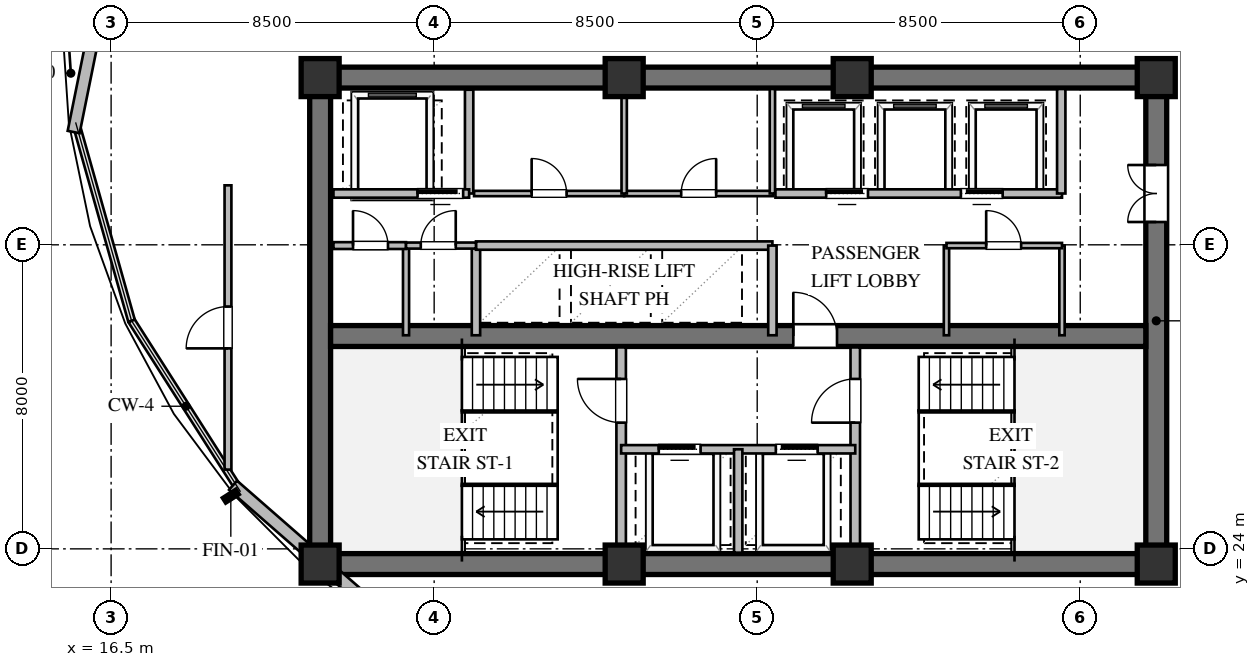
"""IFC4 building model, lengths in metres.
Left out: names, types, materials, properties, quantities, classifications, styles, units other than length and angle.
Written with IfcOpenShell. Run it as: python <this file> out.ifc"""

import sys

from ifc_helpers import new_model, si_unit, direction, frame, frame_2d, origin, origin_2d, place, context, subcontext, project, spatial, rectangle, extrude, element, fill, save


model = new_model("IFC4")
c1 = context("Model", 3, precision=1e-05, world=origin(), true_north=direction((0.0, 1.0)))
c2 = subcontext(c1, "Body", "Model", "MODEL_VIEW")
j1 = project(units=[si_unit("LENGTHUNIT", "METRE"), si_unit("PLANEANGLEUNIT", "RADIAN")], contexts=[c1])
p1 = place(None, origin())
s1 = spatial("IfcSite", under=j1, at=p1, CompositionType="ELEMENT")
p2 = place(p1, origin())
s2 = spatial("IfcBuilding", under=s1, at=p2, CompositionType="ELEMENT")
p3 = place(p2, frame((0.0, 0.0, 106.2)))
s3 = spatial("IfcBuildingStorey", under=s2, at=p3, CompositionType="ELEMENT", Elevation=106.2)
for number, where, z_axis, x_axis in (
    (1, (21.725, 23.6, 0.0), (0.0, 0.0, 1.0), (1.0, 0.0, 0.0)),
    (2, (21.725, 36.4, 0.0), (0.0, 0.0, 1.0), (1.0, 0.0, 0.0)),
):
    element("IfcWall", number, at=place(p3, frame(where, z_axis=z_axis, x_axis=x_axis)), inside=s3, PredefinedType="SHEAR", context=c2, shape_type="SweptSolid", body=[
        extrude(rectangle(XDim=22.55, YDim=0.55, at=frame_2d((11.275, 0.0))), origin(), (0.0, 0.0, 1.0), 3.36),
    ])
p4 = place(p3, frame((22.0, 23.875, 0.0), z_axis=(0.0, 0.0, 1.0), x_axis=(0.0, 1.0, 0.0)))
e3 = element("IfcWall", 3, at=p4, inside=s3, PredefinedType="SHEAR", context=c2, shape_type="SweptSolid", body=[
    extrude(rectangle(XDim=12.25, YDim=0.55, at=frame_2d((6.125, 0.0))), origin(), (0.0, 0.0, 1.0), 3.36),
])
p5 = place(p3, frame((44.0, 23.875, 0.0), z_axis=(0.0, 0.0, 1.0), x_axis=(0.0, 1.0, 0.0)))
e4 = element("IfcWall", 4, at=p5, inside=s3, PredefinedType="SHEAR", context=c2, shape_type="SweptSolid", body=[
    extrude(rectangle(XDim=12.25, YDim=0.55, at=frame_2d((6.125, 0.0))), origin(), (0.0, 0.0, 1.0), 3.36),
])
p6 = place(p5, frame((8.725, 0.0, 0.0)))
e5 = element("IfcOpeningElement", 5, at=p6, cuts=e4, PredefinedType="OPENING", context=c2, shape_type="SweptSolid", body=[
    extrude(rectangle(XDim=1.5, YDim=2.15, at=frame_2d((0.75, 1.075))), frame((0.0, 0.285, 0.0), z_axis=(0.0, -1.0, 0.0), x_axis=(1.0, 0.0, 0.0)), (0.0, 0.0, 1.0), 0.57),
])
p7 = place(p3, frame((22.275, 29.6, 0.0), z_axis=(0.0, 0.0, 1.0), x_axis=(1.0, 0.0, 0.0)))
e6 = element("IfcWall", 6, at=p7, inside=s3, PredefinedType="SHEAR", context=c2, shape_type="SweptSolid", body=[
    extrude(rectangle(XDim=21.45, YDim=0.55, at=frame_2d((10.725, 0.0))), origin(), (0.0, 0.0, 1.0), 3.36),
])
p8 = place(p7, frame((12.175, 0.0, 0.0)))
e7 = element("IfcOpeningElement", 7, at=p8, cuts=e6, PredefinedType="OPENING", context=c2, shape_type="SweptSolid", body=[
    extrude(rectangle(XDim=1.15, YDim=2.1, at=frame_2d((0.575, 1.05))), frame((0.0, 0.285, 0.0), z_axis=(0.0, -1.0, 0.0), x_axis=(1.0, 0.0, 0.0)), (0.0, 0.0, 1.0), 0.57),
])
for number, where, z_axis, x_axis in (
    (8, (22.0, 23.6, 0.0), (0.0, 0.0, 1.0), (1.0, 0.0, 0.0)),
    (9, (30.0, 23.6, 0.0), (0.0, 0.0, 1.0), (1.0, 0.0, 0.0)),
    (10, (36.0, 23.6, 0.0), (0.0, 0.0, 1.0), (1.0, 0.0, 0.0)),
    (11, (44.0, 23.6, 0.0), (0.0, 0.0, 1.0), (1.0, 0.0, 0.0)),
    (12, (44.0, 36.4, 0.0), (0.0, 0.0, 1.0), (1.0, 0.0, 0.0)),
    (13, (36.0, 36.4, 0.0), (0.0, 0.0, 1.0), (1.0, 0.0, 0.0)),
    (14, (30.0, 36.4, 0.0), (0.0, 0.0, 1.0), (1.0, 0.0, 0.0)),
    (15, (22.0, 36.4, 0.0), (0.0, 0.0, 1.0), (1.0, 0.0, 0.0)),
):
    element("IfcColumn", number, at=place(p3, frame(where, z_axis=z_axis, x_axis=x_axis)), inside=s3, PredefinedType="COLUMN", context=c2, shape_type="SweptSolid", body=[
        extrude(rectangle(XDim=1.0, YDim=1.0, at=origin_2d()), origin(), (0.0, 0.0, 1.0), 3.6),
    ])
p9 = place(p3, frame((24.225, 21.727, 0.0), z_axis=(0.0, 0.0, 1.0), x_axis=(-0.753105964003, 0.657899237713, 0.0)))
e16 = element("IfcWall", 16, at=p9, inside=s3, PredefinedType="STANDARD", context=c2, shape_type="SweptSolid", body=[
    extrude(rectangle(XDim=5.998, YDim=0.32, at=frame_2d((2.999, 0.0))), origin(), (0.0, 0.0, 1.0), 2.35),
])
p10 = place(p3, frame((15.514, 34.967, 0.0), z_axis=(0.0, 0.0, 1.0), x_axis=(0.198370893133, 0.980127026848, 0.0)))
e17 = element("IfcWall", 17, at=p10, inside=s3, PredefinedType="STANDARD", context=c2, shape_type="SweptSolid", body=[
    extrude(rectangle(XDim=14.469, YDim=0.32, at=frame_2d((7.234, 0.0))), origin(), (0.0, 0.0, 1.0), 3.36),
])
p11 = place(p3, frame((29.92, 23.9, 0.0), z_axis=(0.0, 0.0, 1.0), x_axis=(0.0, 1.0, 0.0)))
e18 = element("IfcWall", 18, at=p11, inside=s3, PredefinedType="SOLIDWALL", context=c2, shape_type="SweptSolid", body=[
    extrude(rectangle(XDim=5.4, YDim=0.25, at=frame_2d((2.7, 0.0))), origin(), (0.0, 0.0, 1.0), 2.89),
])
p12 = place(p11, frame((3.421, 0.0, 0.0)))
e19 = element("IfcOpeningElement", 19, at=p12, cuts=e18, PredefinedType="OPENING", context=c2, shape_type="SweptSolid", body=[
    extrude(rectangle(XDim=1.15, YDim=2.1, at=frame_2d((0.575, 1.05))), frame((0.0, 0.135, 0.0), z_axis=(0.0, -1.0, 0.0), x_axis=(1.0, 0.0, 0.0)), (0.0, 0.0, 1.0), 0.27),
])
p13 = place(p3, frame((36.08, 23.9, 0.0), z_axis=(0.0, 0.0, 1.0), x_axis=(0.0, 1.0, 0.0)))
e20 = element("IfcWall", 20, at=p13, inside=s3, PredefinedType="SOLIDWALL", context=c2, shape_type="SweptSolid", body=[
    extrude(rectangle(XDim=5.4, YDim=0.25, at=frame_2d((2.7, 0.0))), origin(), (0.0, 0.0, 1.0), 3.36),
])
p14 = place(p13, frame((3.421, 0.0, 0.0)))
e21 = element("IfcOpeningElement", 21, at=p14, cuts=e20, PredefinedType="OPENING", context=c2, shape_type="SweptSolid", body=[
    extrude(rectangle(XDim=1.15, YDim=2.1, at=frame_2d((0.575, 1.05))), frame((0.0, 0.135, 0.0), z_axis=(0.0, -1.0, 0.0), x_axis=(1.0, 0.0, 0.0)), (0.0, 0.0, 1.0), 0.27),
])
p15 = place(p3, frame((29.92, 26.62, 0.0), z_axis=(0.0, 0.0, 1.0), x_axis=(1.0, 0.0, 0.0)))
e22 = element("IfcWall", 22, at=p15, inside=s3, PredefinedType="SOLIDWALL", context=c2, shape_type="SweptSolid", body=[
    extrude(rectangle(XDim=6.16, YDim=0.22, at=frame_2d((3.08, 0.0))), origin(), (0.0, 0.0, 1.0), 3.36),
])
p16 = place(p15, frame((0.99, 0.0, 0.0)))
e23 = element("IfcOpeningElement", 23, at=p16, cuts=e22, PredefinedType="OPENING", context=c2, shape_type="SweptSolid", body=[
    extrude(rectangle(XDim=1.1, YDim=2.1, at=frame_2d((0.55, 1.05))), frame((0.0, 0.12, 0.0), z_axis=(0.0, -1.0, 0.0), x_axis=(1.0, 0.0, 0.0)), (0.0, 0.0, 1.0), 0.24),
])
p17 = place(p15, frame((4.07, 0.0, 0.0)))
e24 = element("IfcOpeningElement", 24, at=p17, cuts=e22, PredefinedType="OPENING", context=c2, shape_type="SweptSolid", body=[
    extrude(rectangle(XDim=1.1, YDim=2.1, at=frame_2d((0.55, 1.05))), frame((0.0, 0.12, 0.0), z_axis=(0.0, -1.0, 0.0), x_axis=(1.0, 0.0, 0.0)), (0.0, 0.0, 1.0), 0.24),
])
p18 = place(p3, frame((33.0, 23.9, 0.0), z_axis=(0.0, 0.0, 1.0), x_axis=(0.0, 1.0, 0.0)))
e25 = element("IfcWall", 25, at=p18, inside=s3, PredefinedType="SOLIDWALL", context=c2, shape_type="SweptSolid", body=[
    extrude(rectangle(XDim=2.72, YDim=0.22, at=frame_2d((1.36, 0.0))), origin(), (0.0, 0.0, 1.0), 3.36),
])
p19 = place(p3, frame((25.92, 33.35, 0.0), z_axis=(0.0, 0.0, 1.0), x_axis=(0.0, 1.0, 0.0)))
e26 = element("IfcWall", 26, at=p19, inside=s3, PredefinedType="SOLIDWALL", context=c2, shape_type="SweptSolid", body=[
    extrude(rectangle(XDim=2.73, YDim=0.22, at=frame_2d((1.365, 0.0))), origin(), (0.0, 0.0, 1.0), 3.36),
])
p20 = place(p3, frame((22.35, 33.35, 0.0), z_axis=(0.0, 0.0, 1.0), x_axis=(1.0, 0.0, 0.0)))
e27 = element("IfcWall", 27, at=p20, inside=s3, PredefinedType="SOLIDWALL", context=c2, shape_type="SweptSolid", body=[
    extrude(rectangle(XDim=3.57, YDim=0.22, at=frame_2d((1.785, 0.0))), origin(), (0.0, 0.0, 1.0), 3.36),
])
p21 = place(p20, frame((2.213, 0.0, 0.0)))
e28 = element("IfcOpeningElement", 28, at=p21, cuts=e27, PredefinedType="OPENING", context=c2, shape_type="SweptSolid", body=[
    extrude(rectangle(XDim=1.2, YDim=2.1, at=frame_2d((0.6, 1.05))), frame((0.0, 0.12, 0.0), z_axis=(0.0, -1.0, 0.0), x_axis=(1.0, 0.0, 0.0)), (0.0, 0.0, 1.0), 0.24),
])
p22 = place(p3, frame((26.1, 29.62, 0.0), z_axis=(0.0, 0.0, 1.0), x_axis=(0.0, 1.0, 0.0)))
e29 = element("IfcWall", 29, at=p22, inside=s3, PredefinedType="SOLIDWALL", context=c2, shape_type="SweptSolid", body=[
    extrude(rectangle(XDim=2.36, YDim=0.22, at=frame_2d((1.18, 0.0))), origin(), (0.0, 0.0, 1.0), 3.36),
])
p23 = place(p3, frame((26.1, 31.98, 0.0), z_axis=(0.0, 0.0, 1.0), x_axis=(1.0, 0.0, 0.0)))
e30 = element("IfcWall", 30, at=p23, inside=s3, PredefinedType="SOLIDWALL", context=c2, shape_type="SweptSolid", body=[
    extrude(rectangle(XDim=7.8, YDim=0.22, at=frame_2d((3.9, 0.0))), origin(), (0.0, 0.0, 1.0), 3.36),
])
p24 = place(p3, frame((33.9, 29.62, 0.0), z_axis=(0.0, 0.0, 1.0), x_axis=(0.0, 1.0, 0.0)))
e31 = element("IfcWall", 31, at=p24, inside=s3, PredefinedType="SOLIDWALL", context=c2, shape_type="SweptSolid", body=[
    extrude(rectangle(XDim=2.36, YDim=0.22, at=frame_2d((1.18, 0.0))), origin(), (0.0, 0.0, 1.0), 3.36),
])
p25 = place(p3, frame((26.05, 33.35, 0.0), z_axis=(0.0, 0.0, 1.0), x_axis=(1.0, 0.0, 0.0)))
e32 = element("IfcWall", 32, at=p25, inside=s3, PredefinedType="PARTITIONING", context=c2, shape_type="SweptSolid", body=[
    extrude(rectangle(XDim=3.95, YDim=0.14, at=frame_2d((1.975, 0.0))), origin(), (0.0, 0.0, 1.0), 3.36),
])
p26 = place(p25, frame((1.515, 0.0, 0.0)))
e33 = element("IfcOpeningElement", 33, at=p26, cuts=e32, PredefinedType="OPENING", context=c2, shape_type="SweptSolid", body=[
    extrude(rectangle(XDim=0.92, YDim=2.1, at=frame_2d((0.46, 1.05))), frame((0.0, 0.08, 0.0), z_axis=(0.0, -1.0, 0.0), x_axis=(1.0, 0.0, 0.0)), (0.0, 0.0, 1.0), 0.16),
])
p27 = place(p3, frame((30.0, 33.35, 0.0), z_axis=(0.0, 0.0, 1.0), x_axis=(1.0, 0.0, 0.0)))
e34 = element("IfcWall", 34, at=p27, inside=s3, PredefinedType="PARTITIONING", context=c2, shape_type="SweptSolid", body=[
    extrude(rectangle(XDim=3.92, YDim=0.14, at=frame_2d((1.96, 0.0))), origin(), (0.0, 0.0, 1.0), 3.36),
])
p28 = place(p27, frame((1.5, 0.0, 0.0)))
e35 = element("IfcOpeningElement", 35, at=p28, cuts=e34, PredefinedType="OPENING", context=c2, shape_type="SweptSolid", body=[
    extrude(rectangle(XDim=0.92, YDim=2.1, at=frame_2d((0.46, 1.05))), frame((0.0, 0.08, 0.0), z_axis=(0.0, -1.0, 0.0), x_axis=(1.0, 0.0, 0.0)), (0.0, 0.0, 1.0), 0.16),
])
for number, where, z_axis, x_axis in (
    (36, (30.0, 33.35, 0.0), (0.0, 0.0, 1.0), (0.0, 1.0, 0.0)),
    (37, (33.9, 33.35, 0.0), (0.0, 0.0, 1.0), (0.0, 1.0, 0.0)),
):
    element("IfcWall", number, at=place(p3, frame(where, z_axis=z_axis, x_axis=x_axis)), inside=s3, PredefinedType="PARTITIONING", context=c2, shape_type="SweptSolid", body=[
        extrude(rectangle(XDim=2.75, YDim=0.14, at=frame_2d((1.375, 0.0))), origin(), (0.0, 0.0, 1.0), 3.36),
    ])
p29 = place(p3, frame((33.98, 33.35, 0.0), z_axis=(0.0, 0.0, 1.0), x_axis=(1.0, 0.0, 0.0)))
e38 = element("IfcWall", 38, at=p29, inside=s3, PredefinedType="SOLIDWALL", context=c2, shape_type="SweptSolid", body=[
    extrude(rectangle(XDim=7.54, YDim=0.22, at=frame_2d((3.77, 0.0))), origin(), (0.0, 0.0, 1.0), 3.36),
])
p30 = place(p29, frame((1.335, 0.0, 0.0)))
e39 = element("IfcOpeningElement", 39, at=p30, cuts=e38, PredefinedType="OPENING", context=c2, shape_type="SweptSolid", body=[
    extrude(rectangle(XDim=1.1, YDim=2.1, at=frame_2d((0.55, 1.05))), frame((0.0, 0.12, 0.0), z_axis=(0.0, -1.0, 0.0), x_axis=(1.0, 0.0, 0.0)), (0.0, 0.0, 1.0), 0.24),
])
p31 = place(p29, frame((4.879, 0.0, 0.0)))
e40 = element("IfcOpeningElement", 40, at=p31, cuts=e38, PredefinedType="OPENING", context=c2, shape_type="SweptSolid", body=[
    extrude(rectangle(XDim=1.1, YDim=2.1, at=frame_2d((0.55, 1.05))), frame((0.0, 0.12, 0.0), z_axis=(0.0, -1.0, 0.0), x_axis=(1.0, 0.0, 0.0)), (0.0, 0.0, 1.0), 0.24),
])
p32 = place(p3, frame((41.5, 33.35, 0.0), z_axis=(0.0, 0.0, 1.0), x_axis=(0.0, 1.0, 0.0)))
e41 = element("IfcWall", 41, at=p32, inside=s3, PredefinedType="SOLIDWALL", context=c2, shape_type="SweptSolid", body=[
    extrude(rectangle(XDim=2.75, YDim=0.22, at=frame_2d((1.375, 0.0))), origin(), (0.0, 0.0, 1.0), 3.36),
])
p33 = place(p3, frame((24.26, 29.62, 0.0), z_axis=(0.0, 0.0, 1.0), x_axis=(0.0, 1.0, 0.0)))
e42 = element("IfcWall", 42, at=p33, inside=s3, PredefinedType="PLUMBINGWALL", context=c2, shape_type="SweptSolid", body=[
    extrude(rectangle(XDim=2.36, YDim=0.16, at=frame_2d((1.18, 0.0))), origin(), (0.0, 0.0, 1.0), 3.36),
])
p34 = place(p3, frame((22.35, 31.98, 0.0), z_axis=(0.0, 0.0, 1.0), x_axis=(1.0, 0.0, 0.0)))
e43 = element("IfcWall", 43, at=p34, inside=s3, PredefinedType="PARTITIONING", context=c2, shape_type="SweptSolid", body=[
    extrude(rectangle(XDim=1.91, YDim=0.18, at=frame_2d((0.955, 0.0))), origin(), (0.0, 0.0, 1.0), 3.36),
])
p35 = place(p34, frame((0.515, 0.0, 0.0)))
e44 = element("IfcOpeningElement", 44, at=p35, cuts=e43, PredefinedType="OPENING", context=c2, shape_type="SweptSolid", body=[
    extrude(rectangle(XDim=0.92, YDim=2.1, at=frame_2d((0.46, 1.05))), frame((0.0, 0.1, 0.0), z_axis=(0.0, -1.0, 0.0), x_axis=(1.0, 0.0, 0.0)), (0.0, 0.0, 1.0), 0.2),
])
p36 = place(p3, frame((24.26, 31.98, 0.0), z_axis=(0.0, 0.0, 1.0), x_axis=(1.0, 0.0, 0.0)))
e45 = element("IfcWall", 45, at=p36, inside=s3, PredefinedType="PLUMBINGWALL", context=c2, shape_type="SweptSolid", body=[
    extrude(rectangle(XDim=1.84, YDim=0.16, at=frame_2d((0.92, 0.0))), origin(), (0.0, 0.0, 1.0), 3.36),
])
p37 = place(p36, frame((0.388, 0.0, 0.0)))
e46 = element("IfcOpeningElement", 46, at=p37, cuts=e45, PredefinedType="OPENING", context=c2, shape_type="SweptSolid", body=[
    extrude(rectangle(XDim=0.92, YDim=2.1, at=frame_2d((0.46, 1.05))), frame((0.0, 0.09, 0.0), z_axis=(0.0, -1.0, 0.0), x_axis=(1.0, 0.0, 0.0)), (0.0, 0.0, 1.0), 0.18),
])
for number, where, z_axis, x_axis in (
    (47, (38.48, 29.62, 0.0), (0.0, 0.0, 1.0), (0.0, 1.0, 0.0)),
    (48, (41.52, 29.62, 0.0), (0.0, 0.0, 1.0), (0.0, 1.0, 0.0)),
):
    element("IfcWall", number, at=place(p3, frame(where, z_axis=z_axis, x_axis=x_axis)), inside=s3, PredefinedType="PARTITIONING", context=c2, shape_type="SweptSolid", body=[
        extrude(rectangle(XDim=2.36, YDim=0.14, at=frame_2d((1.18, 0.0))), origin(), (0.0, 0.0, 1.0), 3.36),
    ])
p38 = place(p3, frame((38.48, 31.98, 0.0), z_axis=(0.0, 0.0, 1.0), x_axis=(1.0, 0.0, 0.0)))
e49 = element("IfcWall", 49, at=p38, inside=s3, PredefinedType="PARTITIONING", context=c2, shape_type="SweptSolid", body=[
    extrude(rectangle(XDim=3.04, YDim=0.14, at=frame_2d((1.52, 0.0))), origin(), (0.0, 0.0, 1.0), 3.36),
])
p39 = place(p38, frame((1.045, 0.0, 0.0)))
e50 = element("IfcOpeningElement", 50, at=p39, cuts=e49, PredefinedType="OPENING", context=c2, shape_type="SweptSolid", body=[
    extrude(rectangle(XDim=0.92, YDim=2.1, at=frame_2d((0.46, 1.05))), frame((0.0, 0.08, 0.0), z_axis=(0.0, -1.0, 0.0), x_axis=(1.0, 0.0, 0.0)), (0.0, 0.0, 1.0), 0.16),
])
p40 = place(p3, frame((19.575, 26.085, 0.0), z_axis=(0.0, 0.0, 1.0), x_axis=(0.0, 1.0, 0.0)))
e51 = element("IfcWall", 51, at=p40, inside=s3, PredefinedType="PARTITIONING", context=c2, shape_type="SweptSolid", body=[
    extrude(rectangle(XDim=7.48, YDim=0.18, at=frame_2d((3.74, 0.0))), origin(), (0.0, 0.0, 1.0), 2.657),
])
p41 = place(p40, frame((3.19, 0.0, 0.0)))
e52 = element("IfcOpeningElement", 52, at=p41, cuts=e51, PredefinedType="OPENING", context=c2, shape_type="SweptSolid", body=[
    extrude(rectangle(XDim=1.1, YDim=2.1, at=frame_2d((0.55, 1.05))), frame((0.0, 0.1, 0.0), z_axis=(0.0, -1.0, 0.0), x_axis=(1.0, 0.0, 0.0)), (0.0, 0.0, 1.0), 0.2),
])
p42 = place(p12, origin())
e53 = element("IfcDoor", 53, at=p42, inside=s3, OperationType="SINGLE_SWING_RIGHT", PredefinedType="DOOR", context=c2, shape_type="SweptSolid", body=[
    extrude(rectangle(XDim=1.15, YDim=2.1, at=frame_2d((0.575, 1.05))), frame((0.0, 0.025, 0.0), z_axis=(0.0, -1.0, 0.0), x_axis=(1.0, 0.0, 0.0)), (0.0, 0.0, 1.0), 0.05),
])
fill(e19, e53)
p43 = place(p14, origin())
e54 = element("IfcDoor", 54, at=p43, inside=s3, OperationType="SINGLE_SWING_LEFT", PredefinedType="DOOR", context=c2, shape_type="SweptSolid", body=[
    extrude(rectangle(XDim=1.15, YDim=2.1, at=frame_2d((0.575, 1.05))), frame((0.0, 0.025, 0.0), z_axis=(0.0, -1.0, 0.0), x_axis=(1.0, 0.0, 0.0)), (0.0, 0.0, 1.0), 0.05),
])
fill(e21, e54)
p44 = place(p16, origin())
e55 = element("IfcDoor", 55, at=p44, inside=s3, OperationType="SLIDING_TO_LEFT", PredefinedType="DOOR", context=c2, shape_type="SweptSolid", body=[
    extrude(rectangle(XDim=1.1, YDim=2.1, at=frame_2d((0.55, 1.05))), frame((0.0, 0.025, 0.0), z_axis=(0.0, -1.0, 0.0), x_axis=(1.0, 0.0, 0.0)), (0.0, 0.0, 1.0), 0.05),
])
fill(e23, e55)
p45 = place(p17, origin())
e56 = element("IfcDoor", 56, at=p45, inside=s3, OperationType="SLIDING_TO_RIGHT", PredefinedType="DOOR", context=c2, shape_type="SweptSolid", body=[
    extrude(rectangle(XDim=1.1, YDim=2.1, at=frame_2d((0.55, 1.05))), frame((0.0, 0.025, 0.0), z_axis=(0.0, -1.0, 0.0), x_axis=(1.0, 0.0, 0.0)), (0.0, 0.0, 1.0), 0.05),
])
fill(e24, e56)
p46 = place(p8, origin())
e57 = element("IfcDoor", 57, at=p46, inside=s3, OperationType="SINGLE_SWING_LEFT", PredefinedType="DOOR", context=c2, shape_type="SweptSolid", body=[
    extrude(rectangle(XDim=1.15, YDim=2.1, at=frame_2d((0.575, 1.05))), frame((0.0, 0.025, 0.0), z_axis=(0.0, -1.0, 0.0), x_axis=(1.0, 0.0, 0.0)), (0.0, 0.0, 1.0), 0.05),
])
fill(e7, e57)
p47 = place(p6, origin())
e58 = element("IfcDoor", 58, at=p47, inside=s3, OperationType="DOUBLE_DOOR_SINGLE_SWING", PredefinedType="DOOR", context=c2, shape_type="SweptSolid", body=[
    extrude(rectangle(XDim=1.5, YDim=2.15, at=frame_2d((0.75, 1.075))), frame((0.0, 0.025, 0.0), z_axis=(0.0, -1.0, 0.0), x_axis=(1.0, 0.0, 0.0)), (0.0, 0.0, 1.0), 0.05),
])
fill(e5, e58)
p48 = place(p21, origin())
e59 = element("IfcDoor", 59, at=p48, inside=s3, OperationType="SLIDING_TO_LEFT", PredefinedType="DOOR", context=c2, shape_type="SweptSolid", body=[
    extrude(rectangle(XDim=1.2, YDim=2.1, at=frame_2d((0.6, 1.05))), frame((0.0, 0.025, 0.0), z_axis=(0.0, -1.0, 0.0), x_axis=(1.0, 0.0, 0.0)), (0.0, 0.0, 1.0), 0.05),
])
fill(e28, e59)
p49 = place(p26, origin())
e60 = element("IfcDoor", 60, at=p49, inside=s3, OperationType="SINGLE_SWING_LEFT", PredefinedType="DOOR", context=c2, shape_type="SweptSolid", body=[
    extrude(rectangle(XDim=0.92, YDim=2.1, at=frame_2d((0.46, 1.05))), frame((0.0, 0.025, 0.0), z_axis=(0.0, -1.0, 0.0), x_axis=(1.0, 0.0, 0.0)), (0.0, 0.0, 1.0), 0.05),
])
fill(e33, e60)
p50 = place(p28, origin())
e61 = element("IfcDoor", 61, at=p50, inside=s3, OperationType="SINGLE_SWING_RIGHT", PredefinedType="DOOR", context=c2, shape_type="SweptSolid", body=[
    extrude(rectangle(XDim=0.92, YDim=2.1, at=frame_2d((0.46, 1.05))), frame((0.0, 0.025, 0.0), z_axis=(0.0, -1.0, 0.0), x_axis=(1.0, 0.0, 0.0)), (0.0, 0.0, 1.0), 0.05),
])
fill(e35, e61)
p51 = place(p30, origin())
e62 = element("IfcDoor", 62, at=p51, inside=s3, OperationType="SLIDING_TO_LEFT", PredefinedType="DOOR", context=c2, shape_type="SweptSolid", body=[
    extrude(rectangle(XDim=1.1, YDim=2.1, at=frame_2d((0.55, 1.05))), frame((0.0, 0.025, 0.0), z_axis=(0.0, -1.0, 0.0), x_axis=(1.0, 0.0, 0.0)), (0.0, 0.0, 1.0), 0.05),
])
fill(e39, e62)
p52 = place(p31, origin())
e63 = element("IfcDoor", 63, at=p52, inside=s3, OperationType="SLIDING_TO_RIGHT", PredefinedType="DOOR", context=c2, shape_type="SweptSolid", body=[
    extrude(rectangle(XDim=1.1, YDim=2.1, at=frame_2d((0.55, 1.05))), frame((0.0, 0.025, 0.0), z_axis=(0.0, -1.0, 0.0), x_axis=(1.0, 0.0, 0.0)), (0.0, 0.0, 1.0), 0.05),
])
fill(e40, e63)
p53 = place(p35, origin())
e64 = element("IfcDoor", 64, at=p53, inside=s3, OperationType="SINGLE_SWING_LEFT", PredefinedType="DOOR", context=c2, shape_type="SweptSolid", body=[
    extrude(rectangle(XDim=0.92, YDim=2.1, at=frame_2d((0.46, 1.05))), frame((0.0, 0.025, 0.0), z_axis=(0.0, -1.0, 0.0), x_axis=(1.0, 0.0, 0.0)), (0.0, 0.0, 1.0), 0.05),
])
fill(e44, e64)
p54 = place(p37, origin())
e65 = element("IfcDoor", 65, at=p54, inside=s3, OperationType="SINGLE_SWING_RIGHT", PredefinedType="DOOR", context=c2, shape_type="SweptSolid", body=[
    extrude(rectangle(XDim=0.92, YDim=2.1, at=frame_2d((0.46, 1.05))), frame((0.0, 0.025, 0.0), z_axis=(0.0, -1.0, 0.0), x_axis=(1.0, 0.0, 0.0)), (0.0, 0.0, 1.0), 0.05),
])
fill(e46, e65)
p55 = place(p39, origin())
e66 = element("IfcDoor", 66, at=p55, inside=s3, OperationType="SINGLE_SWING_LEFT", PredefinedType="DOOR", context=c2, shape_type="SweptSolid", body=[
    extrude(rectangle(XDim=0.92, YDim=2.1, at=frame_2d((0.46, 1.05))), frame((0.0, 0.025, 0.0), z_axis=(0.0, -1.0, 0.0), x_axis=(1.0, 0.0, 0.0)), (0.0, 0.0, 1.0), 0.05),
])
fill(e50, e66)
p56 = place(p41, origin())
e67 = element("IfcDoor", 67, at=p56, inside=s3, OperationType="SINGLE_SWING_LEFT", PredefinedType="DOOR", context=c2, shape_type="SweptSolid", body=[
    extrude(rectangle(XDim=1.1, YDim=2.1, at=frame_2d((0.55, 1.05))), frame((0.0, 0.025, 0.0), z_axis=(0.0, -1.0, 0.0), x_axis=(1.0, 0.0, 0.0)), (0.0, 0.0, 1.0), 0.05),
])
fill(e52, e67)
save(model, sys.argv[1])
